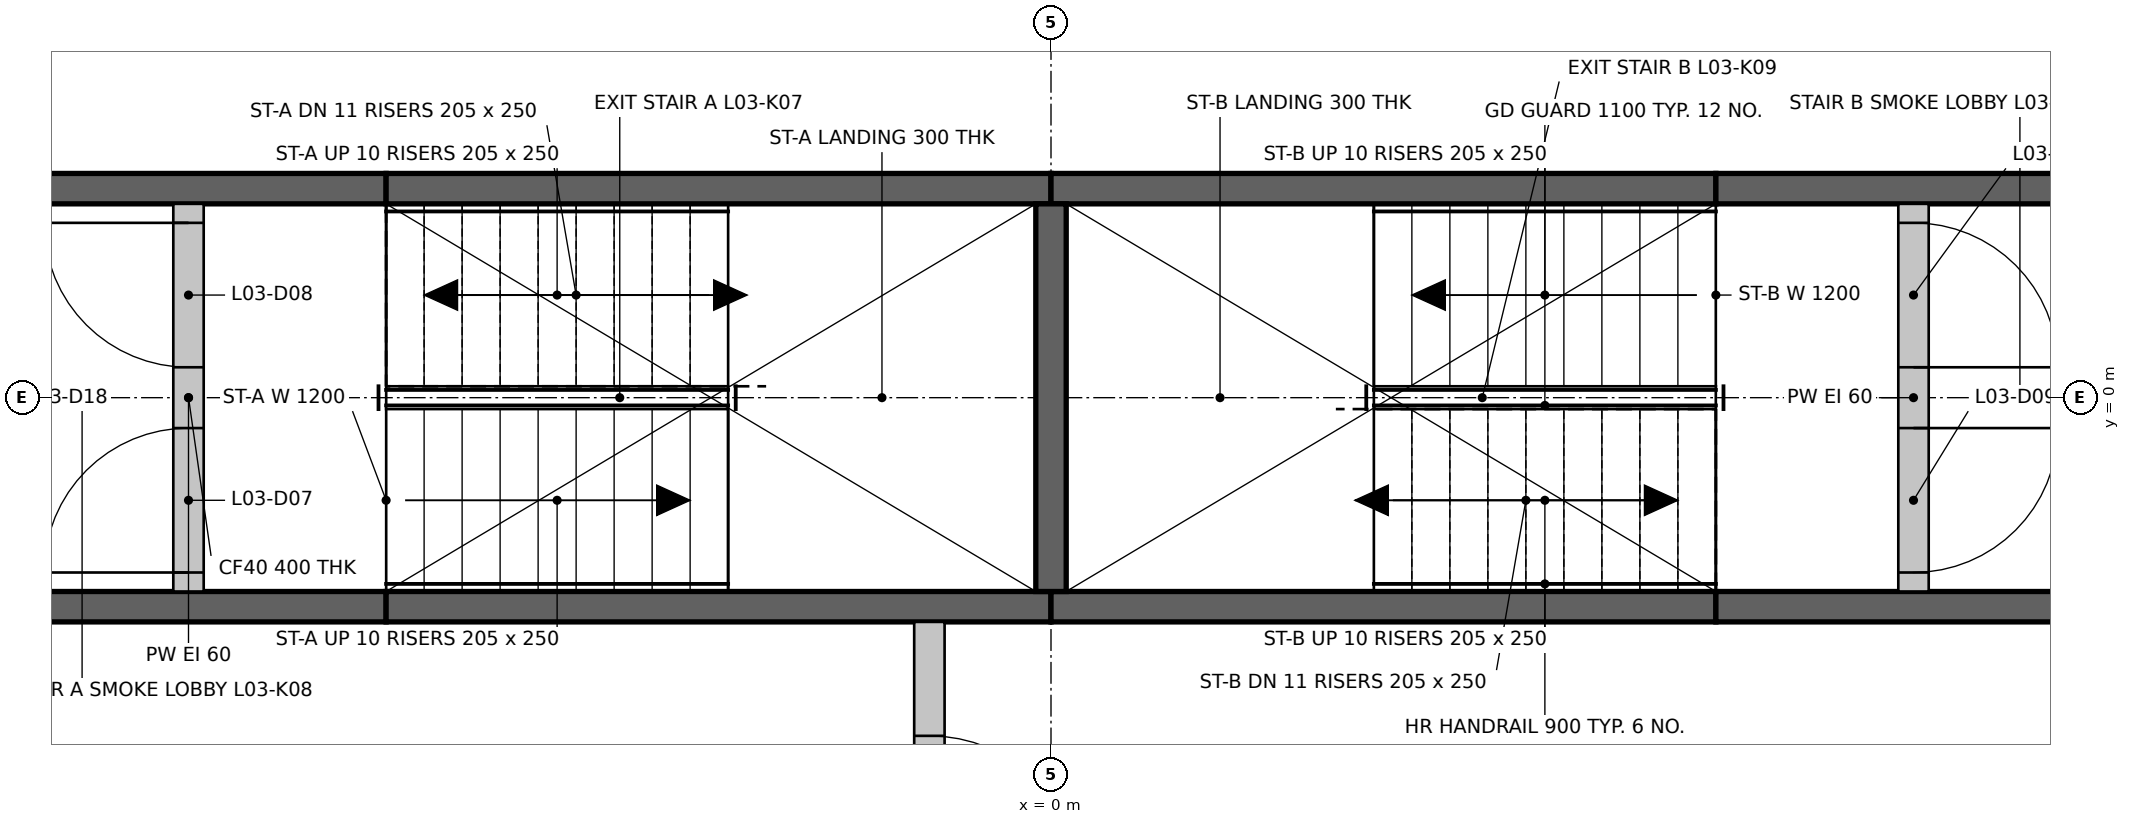
"""IFC4 building model, lengths in metres.
Left out: names, types, materials, properties, quantities, classifications, styles, units other than length and angle.
Written with IfcOpenShell. Run it as: python <this file> out.ifc"""

import sys

from ifc_helpers import new_model, si_unit, direction, frame, frame_2d, origin, place, context, subcontext, project, spatial, rectangle, extrude, element, fill, save


model = new_model("IFC4")
c1 = context("Model", 3, precision=1e-05, world=origin(), true_north=direction((0.0, 1.0)))
c2 = subcontext(c1, "Body", "Model", "MODEL_VIEW")
j1 = project(units=[si_unit("LENGTHUNIT", "METRE"), si_unit("PLANEANGLEUNIT", "RADIAN")], contexts=[c1])
p1 = place(None, origin())
s1 = spatial("IfcSite", under=j1, at=p1, CompositionType="ELEMENT")
p2 = place(p1, origin())
s2 = spatial("IfcBuilding", under=s1, at=p2, CompositionType="ELEMENT")
p3 = place(p2, frame((0.0, 0.0, 14.4)))
s3 = spatial("IfcBuildingStorey", under=s2, at=p3, CompositionType="ELEMENT", Elevation=14.4)
p4 = place(p3, frame((-6.974, -1.375, 0.0), z_axis=(0.0, 0.0, 1.0), x_axis=(1.0, 0.0, 0.0)))
e1 = element("IfcWall", 1, at=p4, inside=s3, PredefinedType="SHEAR", context=c2, shape_type="SweptSolid", body=[
    extrude(rectangle(XDim=2.6, YDim=0.2, at=frame_2d((1.3, 0.0))), origin(), (0.0, 0.0, 1.0), 3.7),
])
for number, where, z_axis, x_axis in (
    (2, (-4.374, -1.375, 0.0), (0.0, 0.0, 1.0), (1.0, 0.0, 0.0)),
    (3, (0.0, -1.375, 0.0), (0.0, 0.0, 1.0), (1.0, 0.0, 0.0)),
):
    element("IfcWall", number, at=place(p3, frame(where, z_axis=z_axis, x_axis=x_axis)), inside=s3, PredefinedType="SHEAR", context=c2, shape_type="SweptSolid", body=[
        extrude(rectangle(XDim=4.374, YDim=0.2, at=frame_2d((2.187, 0.0))), origin(), (0.0, 0.0, 1.0), 3.7),
    ])
for number, where, z_axis, x_axis in (
    (4, (4.374, -1.375, 0.0), (0.0, 0.0, 1.0), (1.0, 0.0, 0.0)),
    (5, (-6.974, 1.375, 0.0), (0.0, 0.0, 1.0), (1.0, 0.0, 0.0)),
):
    element("IfcWall", number, at=place(p3, frame(where, z_axis=z_axis, x_axis=x_axis)), inside=s3, PredefinedType="SHEAR", context=c2, shape_type="SweptSolid", body=[
        extrude(rectangle(XDim=2.6, YDim=0.2, at=frame_2d((1.3, 0.0))), origin(), (0.0, 0.0, 1.0), 3.7),
    ])
for number, where, z_axis, x_axis in (
    (6, (-4.374, 1.375, 0.0), (0.0, 0.0, 1.0), (1.0, 0.0, 0.0)),
    (7, (0.0, 1.375, 0.0), (0.0, 0.0, 1.0), (1.0, 0.0, 0.0)),
):
    element("IfcWall", number, at=place(p3, frame(where, z_axis=z_axis, x_axis=x_axis)), inside=s3, PredefinedType="SHEAR", context=c2, shape_type="SweptSolid", body=[
        extrude(rectangle(XDim=4.374, YDim=0.2, at=frame_2d((2.187, 0.0))), origin(), (0.0, 0.0, 1.0), 3.7),
    ])
p5 = place(p3, frame((4.374, 1.375, 0.0), z_axis=(0.0, 0.0, 1.0), x_axis=(1.0, 0.0, 0.0)))
e8 = element("IfcWall", 8, at=p5, inside=s3, PredefinedType="SHEAR", context=c2, shape_type="SweptSolid", body=[
    extrude(rectangle(XDim=2.6, YDim=0.2, at=frame_2d((1.3, 0.0))), origin(), (0.0, 0.0, 1.0), 3.7),
])
p6 = place(p3, frame((0.0, -1.275, 0.0), z_axis=(0.0, 0.0, 1.0), x_axis=(0.0, 1.0, 0.0)))
e9 = element("IfcWall", 9, at=p6, inside=s3, PredefinedType="SHEAR", context=c2, shape_type="SweptSolid", body=[
    extrude(rectangle(XDim=2.55, YDim=0.2, at=frame_2d((1.275, 0.0))), origin(), (0.0, 0.0, 1.0), 3.7),
])
p7 = place(p3, frame((-0.8, -3.974, 0.0), z_axis=(0.0, 0.0, 1.0), x_axis=(0.0, 1.0, 0.0)))
e10 = element("IfcWall", 10, at=p7, inside=s3, PredefinedType="PARTITIONING", context=c2, shape_type="SweptSolid", body=[
    extrude(rectangle(XDim=2.499, YDim=0.2, at=frame_2d((1.25, 0.0))), origin(), (0.0, 0.0, 1.0), 3.7),
])
p8 = place(p7, frame((0.75, 0.0, 0.0)))
e11 = element("IfcOpeningElement", 11, at=p8, cuts=e10, PredefinedType="OPENING", context=c2, shape_type="SweptSolid", body=[
    extrude(rectangle(XDim=1.0, YDim=2.1, at=frame_2d((0.5, 1.05))), frame((0.0, 0.11, 0.0), z_axis=(0.0, -1.0, 0.0), x_axis=(1.0, 0.0, 0.0)), (0.0, 0.0, 1.0), 0.22),
])
p9 = place(p3, frame((-5.674, -1.275, 0.0), z_axis=(0.0, 0.0, 1.0), x_axis=(0.0, 1.0, 0.0)))
e12 = element("IfcWall", 12, at=p9, inside=s3, PredefinedType="PARTITIONING", context=c2, shape_type="SweptSolid", body=[
    extrude(rectangle(XDim=2.55, YDim=0.2, at=frame_2d((1.275, 0.0))), origin(), (0.0, 0.0, 1.0), 3.7),
])
p10 = place(p9, frame((0.125, 0.0, 0.0)))
e13 = element("IfcOpeningElement", 13, at=p10, cuts=e12, PredefinedType="OPENING", context=c2, shape_type="SweptSolid", body=[
    extrude(rectangle(XDim=0.95, YDim=2.1, at=frame_2d((0.475, 1.05))), frame((0.0, 0.11, 0.0), z_axis=(0.0, -1.0, 0.0), x_axis=(1.0, 0.0, 0.0)), (0.0, 0.0, 1.0), 0.22),
])
p11 = place(p9, frame((1.475, 0.0, 0.0)))
e14 = element("IfcOpeningElement", 14, at=p11, cuts=e12, PredefinedType="OPENING", context=c2, shape_type="SweptSolid", body=[
    extrude(rectangle(XDim=0.95, YDim=2.1, at=frame_2d((0.475, 1.05))), frame((0.0, 0.11, 0.0), z_axis=(0.0, -1.0, 0.0), x_axis=(1.0, 0.0, 0.0)), (0.0, 0.0, 1.0), 0.22),
])
p12 = place(p3, frame((5.674, -1.275, 0.0), z_axis=(0.0, 0.0, 1.0), x_axis=(0.0, 1.0, 0.0)))
e15 = element("IfcWall", 15, at=p12, inside=s3, PredefinedType="PARTITIONING", context=c2, shape_type="SweptSolid", body=[
    extrude(rectangle(XDim=2.55, YDim=0.2, at=frame_2d((1.275, 0.0))), origin(), (0.0, 0.0, 1.0), 3.7),
])
p13 = place(p12, frame((0.125, 0.0, 0.0)))
e16 = element("IfcOpeningElement", 16, at=p13, cuts=e15, PredefinedType="OPENING", context=c2, shape_type="SweptSolid", body=[
    extrude(rectangle(XDim=0.95, YDim=2.1, at=frame_2d((0.475, 1.05))), frame((0.0, 0.11, 0.0), z_axis=(0.0, -1.0, 0.0), x_axis=(1.0, 0.0, 0.0)), (0.0, 0.0, 1.0), 0.22),
])
p14 = place(p12, frame((1.475, 0.0, 0.0)))
e17 = element("IfcOpeningElement", 17, at=p14, cuts=e15, PredefinedType="OPENING", context=c2, shape_type="SweptSolid", body=[
    extrude(rectangle(XDim=0.95, YDim=2.1, at=frame_2d((0.475, 1.05))), frame((0.0, 0.11, 0.0), z_axis=(0.0, -1.0, 0.0), x_axis=(1.0, 0.0, 0.0)), (0.0, 0.0, 1.0), 0.22),
])
p15 = place(p10, origin())
e18 = element("IfcDoor", 18, at=p15, inside=s3, OperationType="SINGLE_SWING_LEFT", PredefinedType="DOOR", context=c2, shape_type="SweptSolid", body=[
    extrude(rectangle(XDim=0.95, YDim=2.1, at=frame_2d((0.475, 1.05))), frame((0.0, 0.025, 0.0), z_axis=(0.0, -1.0, 0.0), x_axis=(1.0, 0.0, 0.0)), (0.0, 0.0, 1.0), 0.05),
])
fill(e13, e18)
p16 = place(p11, origin())
e19 = element("IfcDoor", 19, at=p16, inside=s3, OperationType="SINGLE_SWING_RIGHT", PredefinedType="DOOR", context=c2, shape_type="SweptSolid", body=[
    extrude(rectangle(XDim=0.95, YDim=2.1, at=frame_2d((0.475, 1.05))), frame((0.0, 0.025, 0.0), z_axis=(0.0, -1.0, 0.0), x_axis=(1.0, 0.0, 0.0)), (0.0, 0.0, 1.0), 0.05),
])
fill(e14, e19)
p17 = place(p13, frame((0.95, 0.0, 0.0), z_axis=(0.0, 0.0, 1.0), x_axis=(-1.0, 0.0, 0.0)))
e20 = element("IfcDoor", 20, at=p17, inside=s3, OperationType="SINGLE_SWING_RIGHT", PredefinedType="DOOR", context=c2, shape_type="SweptSolid", body=[
    extrude(rectangle(XDim=0.95, YDim=2.1, at=frame_2d((0.475, 1.05))), frame((0.0, 0.025, 0.0), z_axis=(0.0, -1.0, 0.0), x_axis=(1.0, 0.0, 0.0)), (0.0, 0.0, 1.0), 0.05),
])
fill(e16, e20)
p18 = place(p14, frame((0.95, 0.0, 0.0), z_axis=(0.0, 0.0, 1.0), x_axis=(-1.0, 0.0, 0.0)))
e21 = element("IfcDoor", 21, at=p18, inside=s3, OperationType="SINGLE_SWING_LEFT", PredefinedType="DOOR", context=c2, shape_type="SweptSolid", body=[
    extrude(rectangle(XDim=0.95, YDim=2.1, at=frame_2d((0.475, 1.05))), frame((0.0, 0.025, 0.0), z_axis=(0.0, -1.0, 0.0), x_axis=(1.0, 0.0, 0.0)), (0.0, 0.0, 1.0), 0.05),
])
fill(e17, e21)
p19 = place(p8, frame((1.0, 0.0, 0.0), z_axis=(0.0, 0.0, 1.0), x_axis=(-1.0, 0.0, 0.0)))
e22 = element("IfcDoor", 22, at=p19, inside=s3, OperationType="SINGLE_SWING_LEFT", PredefinedType="DOOR", context=c2, shape_type="SweptSolid", body=[
    extrude(rectangle(XDim=1.0, YDim=2.1, at=frame_2d((0.5, 1.05))), frame((0.0, 0.025, 0.0), z_axis=(0.0, -1.0, 0.0), x_axis=(1.0, 0.0, 0.0)), (0.0, 0.0, 1.0), 0.05),
])
fill(e11, e22)
save(model, sys.argv[1])
